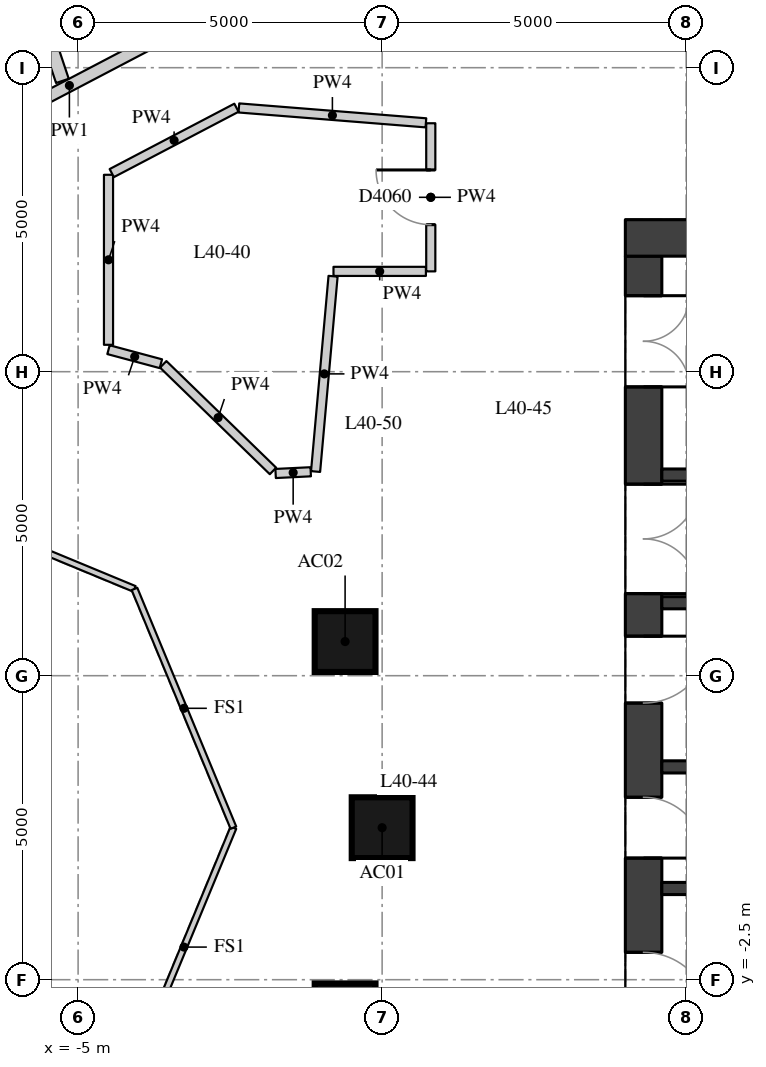
"""IFC4 building model, lengths in metres.
Left out: names, types, materials, properties, quantities, classifications, styles, units other than length and angle.
Written with IfcOpenShell. Run it as: python <this file> out.ifc"""

import sys

from ifc_helpers import new_model, si_unit, direction, frame, frame_2d, origin, origin_2d, place, context, subcontext, project, spatial, rectangle, extrude, element, fill, save


model = new_model("IFC4")
c1 = context("Model", 3, precision=1e-05, world=origin(), true_north=direction((0.0, 1.0)))
c2 = subcontext(c1, "Body", "Model", "MODEL_VIEW")
j1 = project(units=[si_unit("LENGTHUNIT", "METRE"), si_unit("PLANEANGLEUNIT", "RADIAN")], contexts=[c1])
p1 = place(None, origin())
s1 = spatial("IfcSite", under=j1, at=p1, CompositionType="ELEMENT")
p2 = place(p1, origin())
s2 = spatial("IfcBuilding", under=s1, at=p2, CompositionType="ELEMENT")
p3 = place(p2, frame((0.0, 0.0, 145.1)))
s3 = spatial("IfcBuildingStorey", under=s2, at=p3, CompositionType="ELEMENT", Elevation=145.1)
for number, where, z_axis, x_axis in (
    (1, (0.0, 0.0, 0.0), (0.0, 0.0, 1.0), (1.0, 0.0, 0.0)),
    (2, (-0.609, 3.062, 0.0), (0.0, 0.0, 1.0), (1.0, 0.0, 0.0)),
    (3, (-0.609, -3.062, 0.0), (0.0, 0.0, 1.0), (1.0, 0.0, 0.0)),
):
    element("IfcColumn", number, at=place(p3, frame(where, z_axis=z_axis, x_axis=x_axis)), inside=s3, PredefinedType="COLUMN", context=c2, shape_type="SweptSolid", body=[
        extrude(rectangle(XDim=1.0, YDim=1.0, at=origin_2d()), origin(), (0.0, 0.0, 1.0), 3.3),
    ])
p4 = place(p3, frame((4.3, -9.4, 0.0), z_axis=(0.0, 0.0, 1.0), x_axis=(0.0, 1.0, 0.0)))
e4 = element("IfcWall", 4, at=p4, inside=s3, PredefinedType="SHEAR", context=c2, shape_type="SweptSolid", body=[
    extrude(rectangle(XDim=18.8, YDim=0.6, at=frame_2d((9.4, 0.0))), origin(), (0.0, 0.0, 1.0), 3.02),
])
p5 = place(p4, frame((0.65, 0.0, 0.0)))
e5 = element("IfcOpeningElement", 5, at=p5, cuts=e4, PredefinedType="OPENING", context=c2, shape_type="SweptSolid", body=[
    extrude(rectangle(XDim=1.5, YDim=2.1, at=frame_2d((0.75, 1.05))), frame((0.0, 0.31, 0.0), z_axis=(0.0, -1.0, 0.0), x_axis=(1.0, 0.0, 0.0)), (0.0, 0.0, 1.0), 0.62),
])
p6 = place(p4, frame((3.75, 0.0, 0.0)))
e6 = element("IfcOpeningElement", 6, at=p6, cuts=e4, PredefinedType="OPENING", context=c2, shape_type="SweptSolid", body=[
    extrude(rectangle(XDim=1.8, YDim=2.1, at=frame_2d((0.9, 1.05))), frame((0.0, 0.31, 0.0), z_axis=(0.0, -1.0, 0.0), x_axis=(1.0, 0.0, 0.0)), (0.0, 0.0, 1.0), 0.62),
])
p7 = place(p4, frame((6.25, 0.0, 0.0)))
e7 = element("IfcOpeningElement", 7, at=p7, cuts=e4, PredefinedType="OPENING", context=c2, shape_type="SweptSolid", body=[
    extrude(rectangle(XDim=1.1, YDim=2.1, at=frame_2d((0.55, 1.05))), frame((0.0, 0.31, 0.0), z_axis=(0.0, -1.0, 0.0), x_axis=(1.0, 0.0, 0.0)), (0.0, 0.0, 1.0), 0.62),
])
p8 = place(p4, frame((8.9, 0.0, 0.0)))
e8 = element("IfcOpeningElement", 8, at=p8, cuts=e4, PredefinedType="OPENING", context=c2, shape_type="SweptSolid", body=[
    extrude(rectangle(XDim=1.0, YDim=2.1, at=frame_2d((0.5, 1.05))), frame((0.0, 0.31, 0.0), z_axis=(0.0, -1.0, 0.0), x_axis=(1.0, 0.0, 0.0)), (0.0, 0.0, 1.0), 0.62),
])
p9 = place(p4, frame((11.45, 0.0, 0.0)))
e9 = element("IfcOpeningElement", 9, at=p9, cuts=e4, PredefinedType="OPENING", context=c2, shape_type="SweptSolid", body=[
    extrude(rectangle(XDim=1.1, YDim=2.1, at=frame_2d((0.55, 1.05))), frame((0.0, 0.31, 0.0), z_axis=(0.0, -1.0, 0.0), x_axis=(1.0, 0.0, 0.0)), (0.0, 0.0, 1.0), 0.62),
])
p10 = place(p4, frame((13.25, 0.0, 0.0)))
e10 = element("IfcOpeningElement", 10, at=p10, cuts=e4, PredefinedType="OPENING", context=c2, shape_type="SweptSolid", body=[
    extrude(rectangle(XDim=1.8, YDim=2.1, at=frame_2d((0.9, 1.05))), frame((0.0, 0.31, 0.0), z_axis=(0.0, -1.0, 0.0), x_axis=(1.0, 0.0, 0.0)), (0.0, 0.0, 1.0), 0.62),
])
p11 = place(p4, frame((16.65, 0.0, 0.0)))
e11 = element("IfcOpeningElement", 11, at=p11, cuts=e4, PredefinedType="OPENING", context=c2, shape_type="SweptSolid", body=[
    extrude(rectangle(XDim=1.5, YDim=2.1, at=frame_2d((0.75, 1.05))), frame((0.0, 0.31, 0.0), z_axis=(0.0, -1.0, 0.0), x_axis=(1.0, 0.0, 0.0)), (0.0, 0.0, 1.0), 0.62),
])
p12 = place(p3, frame((4.0, 9.7, 0.0), z_axis=(0.0, 0.0, 1.0), x_axis=(1.0, 0.0, 0.0)))
e12 = element("IfcWall", 12, at=p12, inside=s3, PredefinedType="SHEAR", context=c2, shape_type="SweptSolid", body=[
    extrude(rectangle(XDim=12.0, YDim=0.6, at=frame_2d((6.0, 0.0))), origin(), (0.0, 0.0, 1.0), 3.02),
])
p13 = place(p3, frame((4.6, 5.8, 0.0), z_axis=(0.0, 0.0, 1.0), x_axis=(1.0, 0.0, 0.0)))
e13 = element("IfcWall", 13, at=p13, inside=s3, PredefinedType="SHEAR", context=c2, shape_type="SweptSolid", body=[
    extrude(rectangle(XDim=10.8, YDim=0.2, at=frame_2d((5.4, 0.0))), origin(), (0.0, 0.0, 1.0), 3.02),
])
p14 = place(p13, frame((7.05, 0.0, 0.0)))
e14 = element("IfcOpeningElement", 14, at=p14, cuts=e13, PredefinedType="OPENING", context=c2, shape_type="SweptSolid", body=[
    extrude(rectangle(XDim=1.1, YDim=2.1, at=frame_2d((0.55, 1.05))), frame((0.0, 0.11, 0.0), z_axis=(0.0, -1.0, 0.0), x_axis=(1.0, 0.0, 0.0)), (0.0, 0.0, 1.0), 0.22),
])
p15 = place(p13, frame((9.05, 0.0, 0.0)))
e15 = element("IfcOpeningElement", 15, at=p15, cuts=e13, PredefinedType="OPENING", context=c2, shape_type="SweptSolid", body=[
    extrude(rectangle(XDim=1.1, YDim=2.1, at=frame_2d((0.55, 1.05))), frame((0.0, 0.11, 0.0), z_axis=(0.0, -1.0, 0.0), x_axis=(1.0, 0.0, 0.0)), (0.0, 0.0, 1.0), 0.22),
])
p16 = place(p3, frame((4.6, 3.7, 0.0), z_axis=(0.0, 0.0, 1.0), x_axis=(1.0, 0.0, 0.0)))
e16 = element("IfcWall", 16, at=p16, inside=s3, PredefinedType="SHEAR", context=c2, shape_type="SweptSolid", body=[
    extrude(rectangle(XDim=10.8, YDim=0.2, at=frame_2d((5.4, 0.0))), origin(), (0.0, 0.0, 1.0), 3.02),
])
p17 = place(p16, frame((6.6, 0.0, 0.0)))
e17 = element("IfcOpeningElement", 17, at=p17, cuts=e16, PredefinedType="OPENING", context=c2, shape_type="SweptSolid", body=[
    extrude(rectangle(XDim=1.1, YDim=2.1, at=frame_2d((0.55, 1.05))), frame((0.0, 0.11, 0.0), z_axis=(0.0, -1.0, 0.0), x_axis=(1.0, 0.0, 0.0)), (0.0, 0.0, 1.0), 0.22),
])
p18 = place(p16, frame((8.9, 0.0, 0.0)))
e18 = element("IfcOpeningElement", 18, at=p18, cuts=e16, PredefinedType="OPENING", context=c2, shape_type="SweptSolid", body=[
    extrude(rectangle(XDim=1.1, YDim=2.1, at=frame_2d((0.55, 1.05))), frame((0.0, 0.11, 0.0), z_axis=(0.0, -1.0, 0.0), x_axis=(1.0, 0.0, 0.0)), (0.0, 0.0, 1.0), 0.22),
])
for number, where, z_axis, x_axis in (
    (19, (4.6, 1.0, 0.0), (0.0, 0.0, 1.0), (1.0, 0.0, 0.0)),
    (20, (4.6, -1.0, 0.0), (0.0, 0.0, 1.0), (1.0, 0.0, 0.0)),
):
    element("IfcWall", number, at=place(p3, frame(where, z_axis=z_axis, x_axis=x_axis)), inside=s3, PredefinedType="SHEAR", context=c2, shape_type="SweptSolid", body=[
        extrude(rectangle(XDim=10.8, YDim=0.2, at=frame_2d((5.4, 0.0))), origin(), (0.0, 0.0, 1.0), 3.02),
    ])
p19 = place(p3, frame((-7.557, 10.942, 0.0), z_axis=(0.0, 0.0, 1.0), x_axis=(0.885672830659, 0.464309850244, 0.0)))
e21 = element("IfcWall", 21, at=p19, inside=s3, PredefinedType="PARTITIONING", context=c2, shape_type="SweptSolid", body=[
    extrude(rectangle(XDim=5.452, YDim=0.2, at=frame_2d((2.726, 0.0))), origin(), (0.0, 0.0, 1.0), 3.02),
])
p20 = place(p3, frame((-2.669, 13.468, 0.0), z_axis=(0.0, 0.0, 1.0), x_axis=(0.996831622407, -0.079540659849, 0.0)))
e22 = element("IfcWall", 22, at=p20, inside=s3, PredefinedType="PARTITIONING", context=c2, shape_type="SweptSolid", body=[
    extrude(rectangle(XDim=8.349, YDim=0.2, at=frame_2d((4.174, 0.0))), origin(), (0.0, 0.0, 1.0), 3.02),
])
p21 = place(p20, frame((7.109, 0.0, 0.0)))
e23 = element("IfcOpeningElement", 23, at=p21, cuts=e22, PredefinedType="OPENING", context=c2, shape_type="SweptSolid", body=[
    extrude(rectangle(XDim=1.1, YDim=2.1, at=frame_2d((0.55, 1.05))), frame((0.0, 0.11, 0.0), z_axis=(0.0, -1.0, 0.0), x_axis=(1.0, 0.0, 0.0)), (0.0, 0.0, 1.0), 0.22),
])
p22 = place(p20, frame((1.775, 0.0, 0.0)))
e24 = element("IfcOpeningElement", 24, at=p22, cuts=e22, PredefinedType="OPENING", context=c2, shape_type="SweptSolid", body=[
    extrude(rectangle(XDim=1.8, YDim=2.1, at=frame_2d((0.9, 1.05))), frame((0.0, 0.11, 0.0), z_axis=(0.0, -1.0, 0.0), x_axis=(1.0, 0.0, 0.0)), (0.0, 0.0, 1.0), 0.22),
])
p23 = place(p3, frame((0.8, 11.586, 0.0), z_axis=(0.0, 0.0, 1.0), x_axis=(0.0, -1.0, 0.0)))
e25 = element("IfcWall", 25, at=p23, inside=s3, PredefinedType="PARTITIONING", context=c2, shape_type="SweptSolid", body=[
    extrude(rectangle(XDim=2.436, YDim=0.15, at=frame_2d((1.218, 0.0))), origin(), (0.0, 0.0, 1.0), 3.02),
])
p24 = place(p23, frame((0.768, 0.0, 0.0)))
e26 = element("IfcOpeningElement", 26, at=p24, cuts=e25, PredefinedType="OPENING", context=c2, shape_type="SweptSolid", body=[
    extrude(rectangle(XDim=0.9, YDim=2.1, at=frame_2d((0.45, 1.05))), frame((0.0, 0.085, 0.0), z_axis=(0.0, -1.0, 0.0), x_axis=(1.0, 0.0, 0.0)), (0.0, 0.0, 1.0), 0.17),
])
p25 = place(p3, frame((0.72, 9.15, 0.0), z_axis=(0.0, 0.0, 1.0), x_axis=(-1.0, 0.0, 0.0)))
e27 = element("IfcWall", 27, at=p25, inside=s3, PredefinedType="PARTITIONING", context=c2, shape_type="SweptSolid", body=[
    extrude(rectangle(XDim=1.52, YDim=0.15, at=frame_2d((0.76, 0.0))), origin(), (0.0, 0.0, 1.0), 3.02),
])
p26 = place(p3, frame((-0.807, 9.07, 0.0), z_axis=(0.0, 0.0, 1.0), x_axis=(-0.089184087733, -0.996015159772, 0.0)))
e28 = element("IfcWall", 28, at=p26, inside=s3, PredefinedType="PARTITIONING", context=c2, shape_type="SweptSolid", body=[
    extrude(rectangle(XDim=3.225, YDim=0.15, at=frame_2d((1.612, 0.0))), origin(), (0.0, 0.0, 1.0), 3.02),
])
p27 = place(p3, frame((-1.175, 5.854, 0.0), z_axis=(0.0, 0.0, 1.0), x_axis=(-0.998798267986, -0.049010405705, 0.0)))
e29 = element("IfcWall", 29, at=p27, inside=s3, PredefinedType="PARTITIONING", context=c2, shape_type="SweptSolid", body=[
    extrude(rectangle(XDim=0.578, YDim=0.15, at=frame_2d((0.289, 0.0))), origin(), (0.0, 0.0, 1.0), 3.02),
])
p28 = place(p3, frame((-1.795, 5.867, 0.0), z_axis=(0.0, 0.0, 1.0), x_axis=(-0.717315398231, 0.696748605639, 0.0)))
e30 = element("IfcWall", 30, at=p28, inside=s3, PredefinedType="PARTITIONING", context=c2, shape_type="SweptSolid", body=[
    extrude(rectangle(XDim=2.517, YDim=0.15, at=frame_2d((1.258, 0.0))), origin(), (0.0, 0.0, 1.0), 3.02),
])
p29 = place(p3, frame((-3.639, 7.631, 0.0), z_axis=(0.0, 0.0, 1.0), x_axis=(-0.965879594242, 0.258991523853, 0.0)))
e31 = element("IfcWall", 31, at=p29, inside=s3, PredefinedType="PARTITIONING", context=c2, shape_type="SweptSolid", body=[
    extrude(rectangle(XDim=0.892, YDim=0.15, at=frame_2d((0.446, 0.0))), origin(), (0.0, 0.0, 1.0), 3.02),
])
p30 = place(p3, frame((-4.5, 7.942, 0.0), z_axis=(0.0, 0.0, 1.0), x_axis=(0.0, 1.0, 0.0)))
e32 = element("IfcWall", 32, at=p30, inside=s3, PredefinedType="PARTITIONING", context=c2, shape_type="SweptSolid", body=[
    extrude(rectangle(XDim=2.796, YDim=0.15, at=frame_2d((1.398, 0.0))), origin(), (0.0, 0.0, 1.0), 3.02),
])
p31 = place(p3, frame((-4.447, 10.766, 0.0), z_axis=(0.0, 0.0, 1.0), x_axis=(0.885701482048, 0.464255193507, 0.0)))
e33 = element("IfcWall", 33, at=p31, inside=s3, PredefinedType="PARTITIONING", context=c2, shape_type="SweptSolid", body=[
    extrude(rectangle(XDim=2.315, YDim=0.15, at=frame_2d((1.158, 0.0))), origin(), (0.0, 0.0, 1.0), 3.02),
])
p32 = place(p3, frame((-2.356, 11.838, 0.0), z_axis=(0.0, 0.0, 1.0), x_axis=(0.996845649151, -0.079364675829, 0.0)))
e34 = element("IfcWall", 34, at=p32, inside=s3, PredefinedType="PARTITIONING", context=c2, shape_type="SweptSolid", body=[
    extrude(rectangle(XDim=3.085, YDim=0.15, at=frame_2d((1.543, 0.0))), origin(), (0.0, 0.0, 1.0), 3.02),
])
p33 = place(p3, frame((-7.683, 19.545, 0.0), z_axis=(0.0, 0.0, 1.0), x_axis=(0.316706037399, -0.94852374028, 0.0)))
e35 = element("IfcWall", 35, at=p33, inside=s3, PredefinedType="PARTITIONING", context=c2, shape_type="SweptSolid", body=[
    extrude(rectangle(XDim=7.656, YDim=0.22, at=frame_2d((3.828, 0.0))), origin(), (0.0, 0.0, 1.0), 3.02),
])
for number, where, z_axis, x_axis in (
    (36, (-2.446, 0.0, 0.0), (0.0, 0.0, 1.0), (-0.383, -0.924, 0.0)),
    (37, (-8.0, 5.554, 0.0), (0.0, 0.0, 1.0), (0.924, -0.383, 0.0)),
    (38, (-4.073, 3.927, 0.0), (0.0, 0.0, 1.0), (0.383, -0.924, 0.0)),
):
    element("IfcWall", number, at=place(p3, frame(where, z_axis=z_axis, x_axis=x_axis)), inside=s3, PredefinedType="PARTITIONING", context=c2, shape_type="SweptSolid", body=[
        extrude(rectangle(XDim=4.251, YDim=0.1, at=frame_2d((2.125, 0.0))), origin(), (0.0, 0.0, 1.0), 3.02),
    ])
p34 = place(p7, origin())
e39 = element("IfcDoor", 39, at=p34, inside=s3, OperationType="SINGLE_SWING_RIGHT", PredefinedType="DOOR", context=c2, shape_type="SweptSolid", body=[
    extrude(rectangle(XDim=1.1, YDim=2.1, at=frame_2d((0.55, 1.05))), frame((0.0, 0.025, 0.0), z_axis=(0.0, -1.0, 0.0), x_axis=(1.0, 0.0, 0.0)), (0.0, 0.0, 1.0), 0.05),
])
fill(e7, e39)
p35 = place(p8, origin())
e40 = element("IfcDoor", 40, at=p35, inside=s3, OperationType="SINGLE_SWING_RIGHT", PredefinedType="DOOR", context=c2, shape_type="SweptSolid", body=[
    extrude(rectangle(XDim=1.0, YDim=2.1, at=frame_2d((0.5, 1.05))), frame((0.0, 0.025, 0.0), z_axis=(0.0, -1.0, 0.0), x_axis=(1.0, 0.0, 0.0)), (0.0, 0.0, 1.0), 0.05),
])
fill(e8, e40)
p36 = place(p9, origin())
e41 = element("IfcDoor", 41, at=p36, inside=s3, OperationType="SINGLE_SWING_LEFT", PredefinedType="DOOR", context=c2, shape_type="SweptSolid", body=[
    extrude(rectangle(XDim=1.1, YDim=2.1, at=frame_2d((0.55, 1.05))), frame((0.0, 0.025, 0.0), z_axis=(0.0, -1.0, 0.0), x_axis=(1.0, 0.0, 0.0)), (0.0, 0.0, 1.0), 0.05),
])
fill(e9, e41)
p37 = place(p10, origin())
e42 = element("IfcDoor", 42, at=p37, inside=s3, OperationType="DOUBLE_DOOR_SINGLE_SWING", PredefinedType="DOOR", context=c2, shape_type="SweptSolid", body=[
    extrude(rectangle(XDim=1.8, YDim=2.1, at=frame_2d((0.9, 1.05))), frame((0.0, 0.025, 0.0), z_axis=(0.0, -1.0, 0.0), x_axis=(1.0, 0.0, 0.0)), (0.0, 0.0, 1.0), 0.05),
])
fill(e10, e42)
p38 = place(p11, origin())
e43 = element("IfcDoor", 43, at=p38, inside=s3, OperationType="DOUBLE_DOOR_SINGLE_SWING", PredefinedType="DOOR", context=c2, shape_type="SweptSolid", body=[
    extrude(rectangle(XDim=1.5, YDim=2.1, at=frame_2d((0.75, 1.05))), frame((0.0, 0.025, 0.0), z_axis=(0.0, -1.0, 0.0), x_axis=(1.0, 0.0, 0.0)), (0.0, 0.0, 1.0), 0.05),
])
fill(e11, e43)
p39 = place(p24, origin())
e44 = element("IfcDoor", 44, at=p39, inside=s3, OperationType="SINGLE_SWING_RIGHT", PredefinedType="DOOR", context=c2, shape_type="SweptSolid", body=[
    extrude(rectangle(XDim=0.9, YDim=2.1, at=frame_2d((0.45, 1.05))), frame((0.0, 0.025, 0.0), z_axis=(0.0, -1.0, 0.0), x_axis=(1.0, 0.0, 0.0)), (0.0, 0.0, 1.0), 0.05),
])
fill(e26, e44)
save(model, sys.argv[1])
